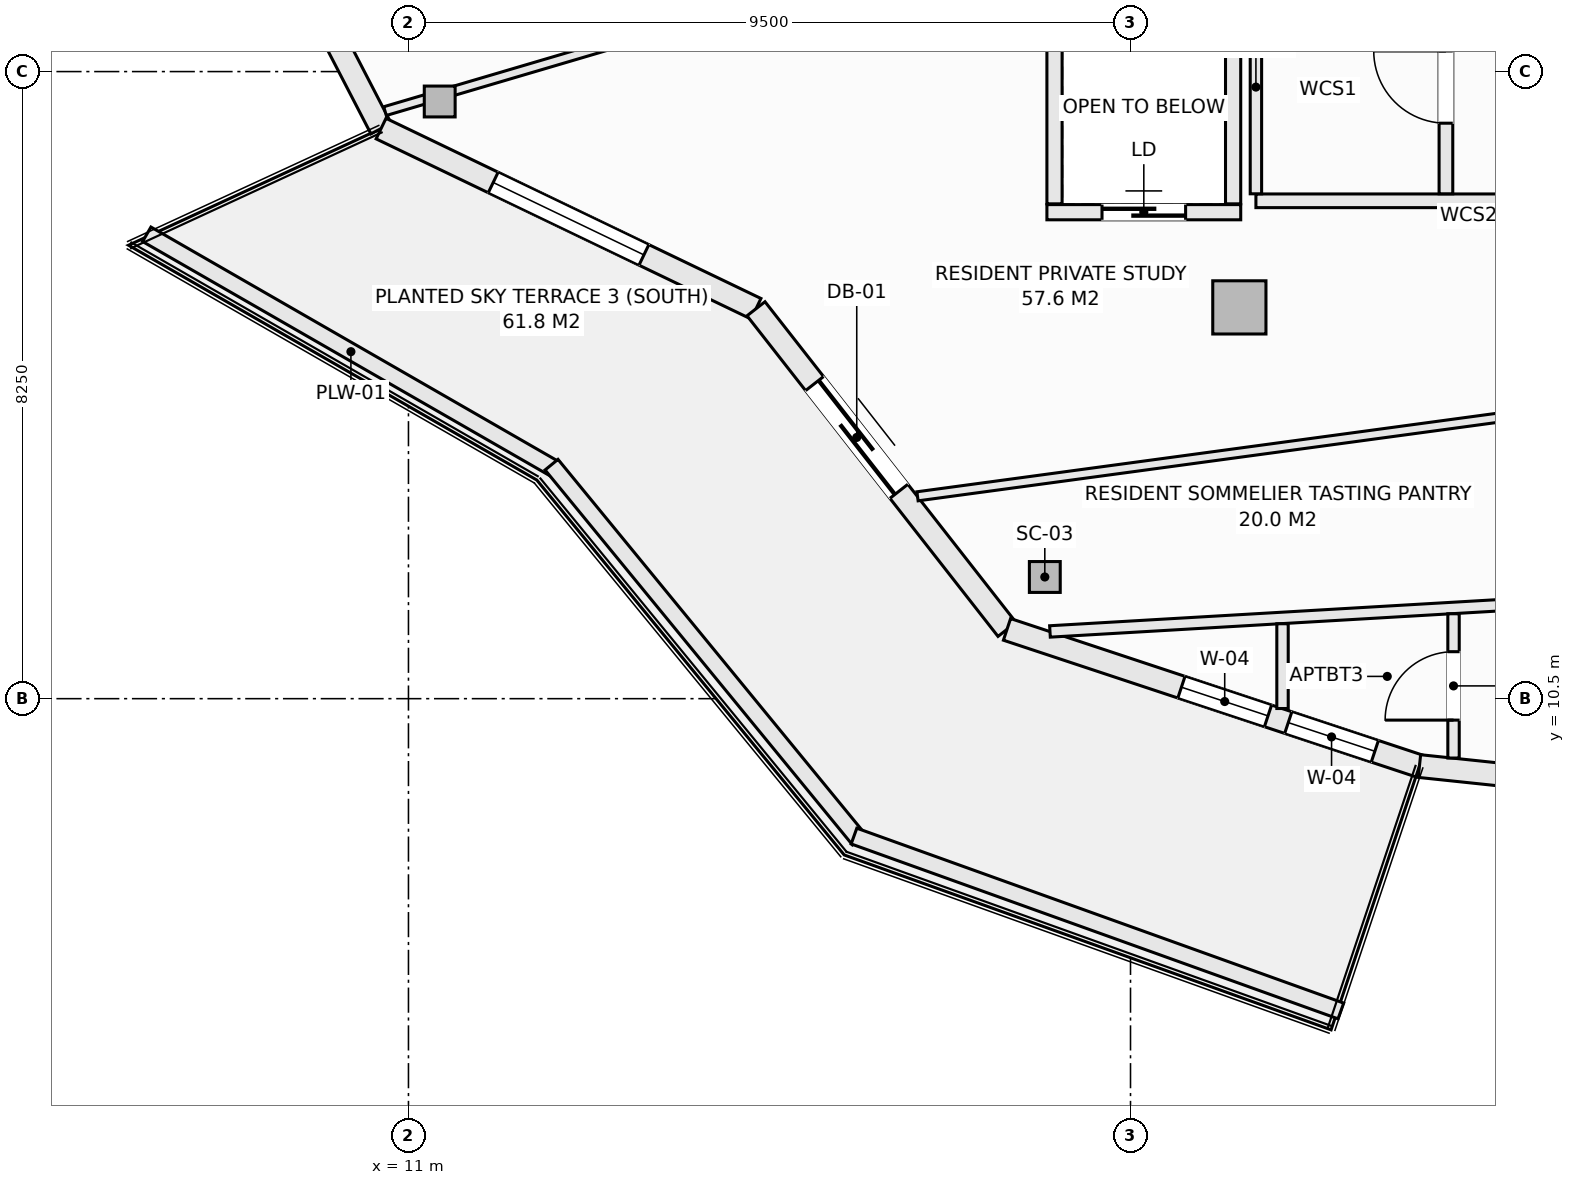
"""IFC4 building model, lengths in metres.
Left out: names, types, materials, properties, quantities, classifications, styles, units other than length and angle.
Written with IfcOpenShell. Run it as: python <this file> out.ifc"""

import sys

from ifc_helpers import new_model, si_unit, direction, frame, frame_2d, origin, origin_2d, place, context, subcontext, project, spatial, rectangle, hollow_rectangle, extrude, element, fill, save


model = new_model("IFC4")
c1 = context("Model", 3, precision=1e-05, world=origin(), true_north=direction((0.0, 1.0)))
c2 = subcontext(c1, "Body", "Model", "MODEL_VIEW")
j1 = project(units=[si_unit("LENGTHUNIT", "METRE"), si_unit("PLANEANGLEUNIT", "RADIAN")], contexts=[c1])
p1 = place(None, origin())
s1 = spatial("IfcSite", under=j1, at=p1, CompositionType="ELEMENT")
p2 = place(p1, origin())
s2 = spatial("IfcBuilding", under=s1, at=p2, CompositionType="ELEMENT")
p3 = place(p2, frame((0.0, 0.0, 245.9)))
s3 = spatial("IfcBuildingStorey", under=s2, at=p3, CompositionType="ELEMENT", Elevation=245.9)
for number, where, z_axis, x_axis in (
    (1, (11.411, 18.356, -0.27), (0.0, 0.0, 1.0), (1.0, 0.0, 0.0)),
    (2, (19.372, 12.101, -0.27), (0.0, 0.0, 1.0), (1.0, 0.0, 0.0)),
):
    element("IfcColumn", number, at=place(p3, frame(where, z_axis=z_axis, x_axis=x_axis)), inside=s3, PredefinedType="COLUMN", context=c2, shape_type="SweptSolid", body=[
        extrude(hollow_rectangle(XDim=0.406, YDim=0.406, WallThickness=0.016, at=origin_2d()), origin(), (0.0, 0.0, 1.0), 3.3),
    ])
p4 = place(p3, frame((21.932, 15.648, -0.27), z_axis=(0.0, 0.0, 1.0), x_axis=(1.0, 0.0, 0.0)))
e3 = element("IfcColumn", 3, at=p4, inside=s3, PredefinedType="COLUMN", context=c2, shape_type="SweptSolid", body=[
    extrude(rectangle(XDim=0.7, YDim=0.7, at=origin_2d()), origin(), (0.0, 0.0, 1.0), 3.3),
])
p5 = place(p3, frame((8.392, 22.341, 0.0), z_axis=(0.0, 0.0, 1.0), x_axis=(0.459793771602, -0.888025724625, 0.0)))
e4 = element("IfcWall", 4, at=p5, inside=s3, PredefinedType="SOLIDWALL", context=c2, shape_type="SweptSolid", body=[
    extrude(rectangle(XDim=4.889, YDim=0.3, at=frame_2d((2.444, 0.0))), origin(), (0.0, 0.0, 1.0), 2.605),
])
p6 = place(p5, frame((1.344, 0.0, 0.72)))
e5 = element("IfcOpeningElement", 5, at=p6, cuts=e4, PredefinedType="OPENING", context=c2, shape_type="SweptSolid", body=[
    extrude(rectangle(XDim=2.2, YDim=1.65, at=frame_2d((1.1, 0.825))), frame((0.0, 0.16, 0.0), z_axis=(0.0, -1.0, 0.0), x_axis=(1.0, 0.0, 0.0)), (0.0, 0.0, 1.0), 0.32),
])
p7 = place(p3, frame((10.639, 18.0, 0.0), z_axis=(0.0, 0.0, 1.0), x_axis=(0.901355238351, -0.433080517106, 0.0)))
e6 = element("IfcWall", 6, at=p7, inside=s3, PredefinedType="SOLIDWALL", context=c2, shape_type="SweptSolid", body=[
    extrude(rectangle(XDim=5.473, YDim=0.3, at=frame_2d((2.737, 0.0))), origin(), (0.0, 0.0, 1.0), 2.605),
])
p8 = place(p7, frame((1.637, 0.0, 0.72)))
e7 = element("IfcOpeningElement", 7, at=p8, cuts=e6, PredefinedType="OPENING", context=c2, shape_type="SweptSolid", body=[
    extrude(rectangle(XDim=2.2, YDim=1.65, at=frame_2d((1.1, 0.825))), frame((0.0, 0.16, 0.0), z_axis=(0.0, -1.0, 0.0), x_axis=(1.0, 0.0, 0.0)), (0.0, 0.0, 1.0), 0.32),
])
p9 = place(p3, frame((15.573, 15.63, 0.0), z_axis=(0.0, 0.0, 1.0), x_axis=(0.61644588519, -0.787397276241, 0.0)))
e8 = element("IfcWall", 8, at=p9, inside=s3, PredefinedType="SOLIDWALL", context=c2, shape_type="SweptSolid", body=[
    extrude(rectangle(XDim=5.357, YDim=0.3, at=frame_2d((2.678, 0.0))), origin(), (0.0, 0.0, 1.0), 2.605),
])
p10 = place(p9, frame((1.25, 0.0, 0.0)))
e9 = element("IfcOpeningElement", 9, at=p10, cuts=e8, PredefinedType="OPENING", context=c2, shape_type="SweptSolid", body=[
    extrude(rectangle(XDim=1.8, YDim=2.25, at=frame_2d((0.9, 1.125))), frame((0.0, 0.16, 0.0), z_axis=(0.0, -1.0, 0.0), x_axis=(1.0, 0.0, 0.0)), (0.0, 0.0, 1.0), 0.32),
])
p11 = place(p3, frame((18.875, 11.412, 0.0), z_axis=(0.0, 0.0, 1.0), x_axis=(0.949232769585, -0.314574552605, 0.0)))
e10 = element("IfcWall", 10, at=p11, inside=s3, PredefinedType="SOLIDWALL", context=c2, shape_type="SweptSolid", body=[
    extrude(rectangle(XDim=5.717, YDim=0.3, at=frame_2d((2.858, 0.0))), origin(), (0.0, 0.0, 1.0), 2.605),
])
p12 = place(p11, frame((2.417, 0.0, 0.72)))
e11 = element("IfcOpeningElement", 11, at=p12, cuts=e10, PredefinedType="OPENING", context=c2, shape_type="SweptSolid", body=[
    extrude(rectangle(XDim=1.2, YDim=1.65, at=frame_2d((0.6, 0.825))), frame((0.0, 0.16, 0.0), z_axis=(0.0, -1.0, 0.0), x_axis=(1.0, 0.0, 0.0)), (0.0, 0.0, 1.0), 0.32),
])
p13 = place(p11, frame((3.898, 0.0, 0.72)))
e12 = element("IfcOpeningElement", 12, at=p13, cuts=e10, PredefinedType="OPENING", context=c2, shape_type="SweptSolid", body=[
    extrude(rectangle(XDim=1.2, YDim=1.65, at=frame_2d((0.6, 0.825))), frame((0.0, 0.16, 0.0), z_axis=(0.0, -1.0, 0.0), x_axis=(1.0, 0.0, 0.0)), (0.0, 0.0, 1.0), 0.32),
])
p14 = place(p3, frame((24.302, 9.613, 0.0), z_axis=(0.0, 0.0, 1.0), x_axis=(0.994500425783, -0.10473253132, 0.0)))
e13 = element("IfcWall", 13, at=p14, inside=s3, PredefinedType="SOLIDWALL", context=c2, shape_type="SweptSolid", body=[
    extrude(rectangle(XDim=5.856, YDim=0.3, at=frame_2d((2.928, 0.0))), origin(), (0.0, 0.0, 1.0), 2.605),
])
p15 = place(p14, frame((1.828, 0.0, 0.72)))
e14 = element("IfcOpeningElement", 14, at=p15, cuts=e13, PredefinedType="OPENING", context=c2, shape_type="SweptSolid", body=[
    extrude(rectangle(XDim=2.2, YDim=1.65, at=frame_2d((1.1, 0.825))), frame((0.0, 0.16, 0.0), z_axis=(0.0, -1.0, 0.0), x_axis=(1.0, 0.0, 0.0)), (0.0, 0.0, 1.0), 0.32),
])
p16 = place(p3, frame((7.557, 16.609, 0.0), z_axis=(0.0, 0.0, 1.0), x_axis=(0.866901621005, -0.49847926687, 0.0)))
e15 = element("IfcWall", 15, at=p16, inside=s3, PredefinedType="PARAPET", context=c2, shape_type="SweptSolid", body=[
    extrude(rectangle(XDim=6.197, YDim=0.22, at=frame_2d((3.098, 0.0))), origin(), (0.0, 0.0, 1.0), 0.52),
])
p17 = place(p3, frame((12.882, 13.579, 0.0), z_axis=(0.0, 0.0, 1.0), x_axis=(0.63407318032, -0.77327304492, 0.0)))
e16 = element("IfcWall", 16, at=p17, inside=s3, PredefinedType="PARAPET", context=c2, shape_type="SweptSolid", body=[
    extrude(rectangle(XDim=6.379, YDim=0.22, at=frame_2d((3.189, 0.0))), origin(), (0.0, 0.0, 1.0), 0.52),
])
p18 = place(p3, frame((16.862, 8.692, 0.0), z_axis=(0.0, 0.0, 1.0), x_axis=(0.941139090914, -0.338019543152, 0.0)))
e17 = element("IfcWall", 17, at=p18, inside=s3, PredefinedType="PARAPET", context=c2, shape_type="SweptSolid", body=[
    extrude(rectangle(XDim=6.807, YDim=0.22, at=frame_2d((3.403, 0.0))), origin(), (0.0, 0.0, 1.0), 0.52),
])
p19 = place(p3, frame((19.4, 16.9, 0.0), z_axis=(0.0, 0.0, 1.0), x_axis=(1.0, 0.0, 0.0)))
e18 = element("IfcWall", 18, at=p19, inside=s3, PredefinedType="SOLIDWALL", context=c2, shape_type="SweptSolid", body=[
    extrude(rectangle(XDim=2.55, YDim=0.2, at=frame_2d((1.275, 0.0))), origin(), (0.0, 0.0, 1.0), 3.03),
])
p20 = place(p19, frame((0.725, 0.0, 0.0)))
e19 = element("IfcOpeningElement", 19, at=p20, cuts=e18, PredefinedType="OPENING", context=c2, shape_type="SweptSolid", body=[
    extrude(rectangle(XDim=1.1, YDim=2.2, at=frame_2d((0.55, 1.1))), frame((0.0, 0.11, 0.0), z_axis=(0.0, -1.0, 0.0), x_axis=(1.0, 0.0, 0.0)), (0.0, 0.0, 1.0), 0.22),
])
for number, where, z_axis, x_axis in (
    (20, (19.5, 17.01, 0.0), (0.0, 0.0, 1.0), (0.0, 1.0, 0.0)),
    (21, (21.85, 17.01, 0.0), (0.0, 0.0, 1.0), (0.0, 1.0, 0.0)),
):
    element("IfcWall", number, at=place(p3, frame(where, z_axis=z_axis, x_axis=x_axis)), inside=s3, PredefinedType="SOLIDWALL", context=c2, shape_type="SweptSolid", body=[
        extrude(rectangle(XDim=2.53, YDim=0.2, at=frame_2d((1.265, 0.0))), origin(), (0.0, 0.0, 1.0), 3.03),
    ])
p21 = place(p3, frame((22.15, 17.05, 0.0), z_axis=(0.0, 0.0, 1.0), x_axis=(1.0, 0.0, 0.0)))
e22 = element("IfcWall", 22, at=p21, inside=s3, PredefinedType="SOLIDWALL", context=c2, shape_type="SweptSolid", body=[
    extrude(rectangle(XDim=5.0, YDim=0.18, at=frame_2d((2.5, 0.0))), origin(), (0.0, 0.0, 1.0), 3.03),
])
p22 = place(p3, frame((22.15, 17.142, 0.0), z_axis=(0.0, 0.0, 1.0), x_axis=(0.0, 1.0, 0.0)))
e23 = element("IfcWall", 23, at=p22, inside=s3, PredefinedType="PARTITIONING", context=c2, shape_type="SweptSolid", body=[
    extrude(rectangle(XDim=2.808, YDim=0.15, at=frame_2d((1.404, 0.0))), origin(), (0.0, 0.0, 1.0), 3.03),
])
p23 = place(p3, frame((24.65, 17.142, 0.0), z_axis=(0.0, 0.0, 1.0), x_axis=(0.0, 1.0, 0.0)))
e24 = element("IfcWall", 24, at=p23, inside=s3, PredefinedType="SOLIDWALL", context=c2, shape_type="SweptSolid", body=[
    extrude(rectangle(XDim=2.808, YDim=0.18, at=frame_2d((1.404, 0.0))), origin(), (0.0, 0.0, 1.0), 3.03),
])
p24 = place(p23, frame((0.929, 0.0, 0.0)))
e25 = element("IfcOpeningElement", 25, at=p24, cuts=e24, PredefinedType="OPENING", context=c2, shape_type="SweptSolid", body=[
    extrude(rectangle(XDim=0.95, YDim=2.1, at=frame_2d((0.475, 1.05))), frame((0.0, 0.1, 0.0), z_axis=(0.0, -1.0, 0.0), x_axis=(1.0, 0.0, 0.0)), (0.0, 0.0, 1.0), 0.2),
])
p25 = place(p3, frame((10.692, 18.23, 0.0), z_axis=(0.0, 0.0, 1.0), x_axis=(0.959163130609, 0.282853475992, 0.0)))
e26 = element("IfcWall", 26, at=p25, inside=s3, PredefinedType="PARTITIONING", context=c2, shape_type="SweptSolid", body=[
    extrude(rectangle(XDim=6.039, YDim=0.12, at=frame_2d((3.02, 0.0))), origin(), (0.0, 0.0, 1.0), 2.77),
])
p26 = place(p3, frame((17.698, 13.162, 0.0), z_axis=(0.0, 0.0, 1.0), x_axis=(0.990958840374, 0.134166227808, 0.0)))
e27 = element("IfcWall", 27, at=p26, inside=s3, PredefinedType="PARTITIONING", context=c2, shape_type="SweptSolid", body=[
    extrude(rectangle(XDim=9.446, YDim=0.12, at=frame_2d((4.723, 0.0))), origin(), (0.0, 0.0, 1.0), 3.03),
])
p27 = place(p3, frame((19.44, 11.384, 0.0), z_axis=(0.0, 0.0, 1.0), x_axis=(0.998303266402, 0.058228758288, 0.0)))
e28 = element("IfcWall", 28, at=p27, inside=s3, PredefinedType="PARTITIONING", context=c2, shape_type="SweptSolid", body=[
    extrude(rectangle(XDim=7.631, YDim=0.15, at=frame_2d((3.815, 0.0))), origin(), (0.0, 0.0, 1.0), 2.605),
])
p28 = place(p3, frame((24.75, 9.719, 0.0), z_axis=(0.0, 0.0, 1.0), x_axis=(0.0, 1.0, 0.0)))
e29 = element("IfcWall", 29, at=p28, inside=s3, PredefinedType="PARTITIONING", context=c2, shape_type="SweptSolid", body=[
    extrude(rectangle(XDim=1.898, YDim=0.15, at=frame_2d((0.949, 0.0))), origin(), (0.0, 0.0, 1.0), 2.77),
])
p29 = place(p28, frame((0.499, 0.0, 0.0)))
e30 = element("IfcOpeningElement", 30, at=p29, cuts=e29, PredefinedType="OPENING", context=c2, shape_type="SweptSolid", body=[
    extrude(rectangle(XDim=0.9, YDim=2.1, at=frame_2d((0.45, 1.05))), frame((0.0, 0.085, 0.0), z_axis=(0.0, -1.0, 0.0), x_axis=(1.0, 0.0, 0.0)), (0.0, 0.0, 1.0), 0.17),
])
p30 = place(p3, frame((22.5, 10.37, 0.0), z_axis=(0.0, 0.0, 1.0), x_axis=(0.0, 1.0, 0.0)))
e31 = element("IfcWall", 31, at=p30, inside=s3, PredefinedType="PARTITIONING", context=c2, shape_type="SweptSolid", body=[
    extrude(rectangle(XDim=1.115, YDim=0.15, at=frame_2d((0.558, 0.0))), origin(), (0.0, 0.0, 1.0), 3.03),
])
p31 = place(p8, origin())
e32 = element("IfcWindow", 32, at=p31, inside=s3, PartitioningType="SINGLE_PANEL", PredefinedType="WINDOW", context=c2, shape_type="SweptSolid", body=[
    extrude(rectangle(XDim=2.2, YDim=1.65, at=frame_2d((1.1, 0.825))), frame((0.0, 0.03, 0.0), z_axis=(0.0, -1.0, 0.0), x_axis=(1.0, 0.0, 0.0)), (0.0, 0.0, 1.0), 0.06),
])
fill(e7, e32)
p32 = place(p10, frame((1.8, 0.0, 0.0), z_axis=(0.0, 0.0, 1.0), x_axis=(-1.0, 0.0, 0.0)))
e33 = element("IfcDoor", 33, at=p32, inside=s3, OperationType="SLIDING_TO_LEFT", PredefinedType="DOOR", context=c2, shape_type="SweptSolid", body=[
    extrude(rectangle(XDim=1.8, YDim=2.25, at=frame_2d((0.9, 1.125))), frame((0.0, 0.025, 0.0), z_axis=(0.0, -1.0, 0.0), x_axis=(1.0, 0.0, 0.0)), (0.0, 0.0, 1.0), 0.05),
])
fill(e9, e33)
p33 = place(p12, origin())
e34 = element("IfcWindow", 34, at=p33, inside=s3, PartitioningType="SINGLE_PANEL", PredefinedType="WINDOW", context=c2, shape_type="SweptSolid", body=[
    extrude(rectangle(XDim=1.2, YDim=1.65, at=frame_2d((0.6, 0.825))), frame((0.0, 0.03, 0.0), z_axis=(0.0, -1.0, 0.0), x_axis=(1.0, 0.0, 0.0)), (0.0, 0.0, 1.0), 0.06),
])
fill(e11, e34)
p34 = place(p20, origin())
e35 = element("IfcDoor", 35, at=p34, inside=s3, OperationType="SLIDING_TO_LEFT", PredefinedType="DOOR", context=c2, shape_type="SweptSolid", body=[
    extrude(rectangle(XDim=1.1, YDim=2.2, at=frame_2d((0.55, 1.1))), frame((0.0, 0.025, 0.0), z_axis=(0.0, -1.0, 0.0), x_axis=(1.0, 0.0, 0.0)), (0.0, 0.0, 1.0), 0.05),
])
fill(e19, e35)
p35 = place(p29, origin())
e36 = element("IfcDoor", 36, at=p35, inside=s3, OperationType="SINGLE_SWING_LEFT", PredefinedType="DOOR", context=c2, shape_type="SweptSolid", body=[
    extrude(rectangle(XDim=0.9, YDim=2.1, at=frame_2d((0.45, 1.05))), frame((0.0, 0.025, 0.0), z_axis=(0.0, -1.0, 0.0), x_axis=(1.0, 0.0, 0.0)), (0.0, 0.0, 1.0), 0.05),
])
fill(e30, e36)
p36 = place(p24, origin())
e37 = element("IfcDoor", 37, at=p36, inside=s3, OperationType="SINGLE_SWING_RIGHT", PredefinedType="DOOR", context=c2, shape_type="SweptSolid", body=[
    extrude(rectangle(XDim=0.95, YDim=2.1, at=frame_2d((0.475, 1.05))), frame((0.0, 0.025, 0.0), z_axis=(0.0, -1.0, 0.0), x_axis=(1.0, 0.0, 0.0)), (0.0, 0.0, 1.0), 0.05),
])
fill(e25, e37)
p37 = place(p13, origin())
e38 = element("IfcWindow", 38, at=p37, inside=s3, PartitioningType="SINGLE_PANEL", PredefinedType="WINDOW", context=c2, shape_type="SweptSolid", body=[
    extrude(rectangle(XDim=1.2, YDim=1.65, at=frame_2d((0.6, 0.825))), frame((0.0, 0.03, 0.0), z_axis=(0.0, -1.0, 0.0), x_axis=(1.0, 0.0, 0.0)), (0.0, 0.0, 1.0), 0.06),
])
fill(e12, e38)
save(model, sys.argv[1])
